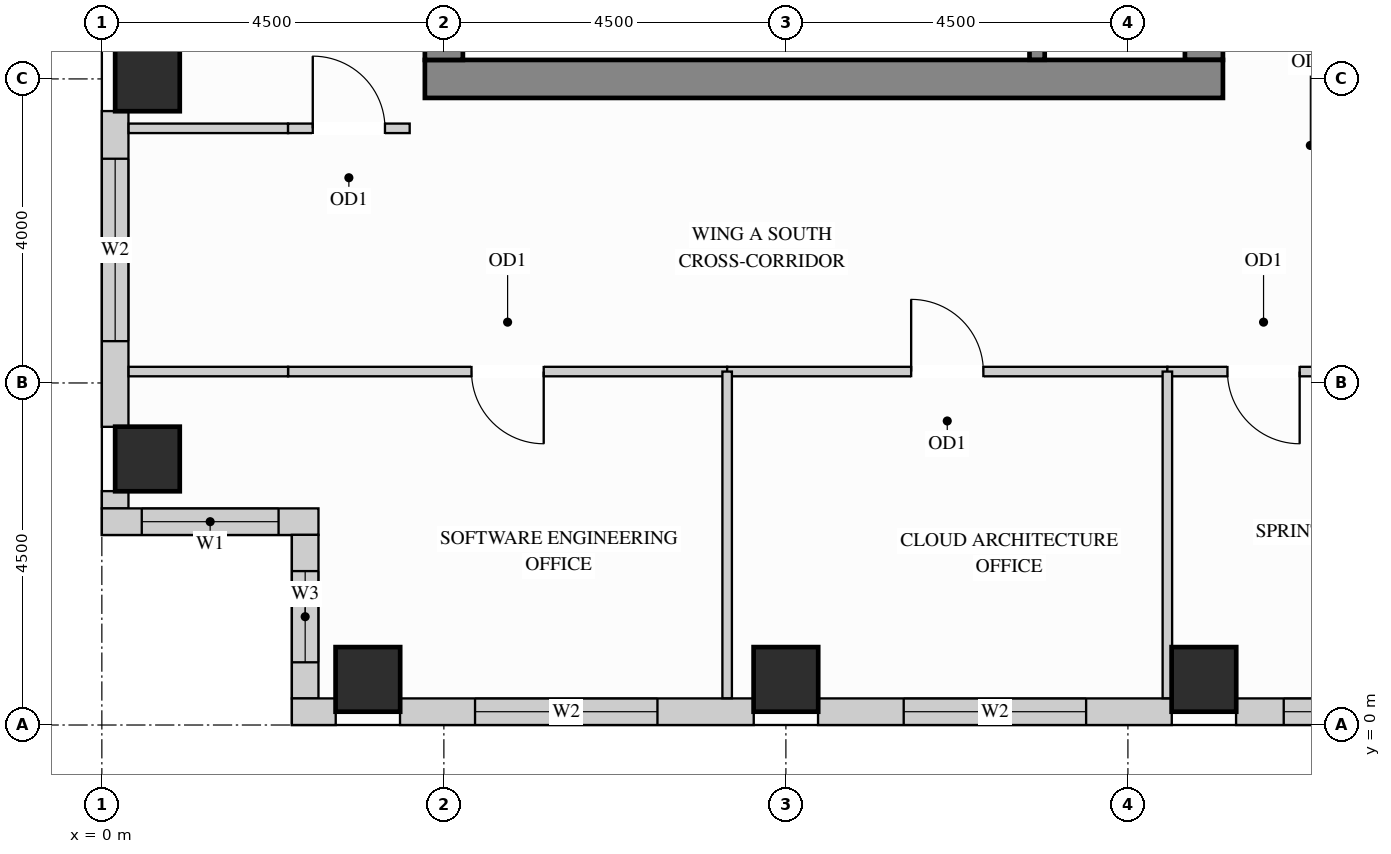
"""IFC4 building model, lengths in metres.
Left out: names, types, materials, properties, quantities, classifications, styles, units other than length and angle.
Written with IfcOpenShell. Run it as: python <this file> out.ifc"""

import sys

from ifc_helpers import new_model, si_unit, direction, frame, frame_2d, origin, origin_2d, place, context, subcontext, project, spatial, rectangle, extrude, source, transform, mapped, element, fill, save


model = new_model("IFC4")
c1 = context("Model", 3, precision=1e-05, world=origin(), true_north=direction((0.0, 1.0)))
c2 = subcontext(c1, "Body", "Model", "MODEL_VIEW")
j1 = project(units=[si_unit("LENGTHUNIT", "METRE"), si_unit("PLANEANGLEUNIT", "RADIAN")], contexts=[c1])
p1 = place(None, origin())
s1 = spatial("IfcSite", under=j1, at=p1, CompositionType="ELEMENT")
p2 = place(p1, origin())
s2 = spatial("IfcBuilding", under=s1, at=p2, CompositionType="ELEMENT")
p3 = place(p2, frame((0.0, 0.0, 212.4)))
s3 = spatial("IfcBuildingStorey", under=s2, at=p3, CompositionType="ELEMENT", Elevation=212.4)
m1 = source(origin(), c2, "Body", "SweptSolid", [
    extrude(rectangle(XDim=0.85, YDim=0.85, at=origin_2d()), origin(), (0.0, 0.0, 1.0), 3.4),
])
for number, where, z_axis, x_axis in (
    (1, (14.5, 0.6, 0.0), (0.0, 0.0, 1.0), (1.0, 0.0, 0.0)),
    (2, (3.5, 0.6, 0.0), (0.0, 0.0, 1.0), (1.0, 0.0, 0.0)),
    (3, (9.0, 0.6, 0.0), (0.0, 0.0, 1.0), (1.0, 0.0, 0.0)),
    (4, (0.6, 3.5, 0.0), (0.0, 0.0, 1.0), (1.0, 0.0, 0.0)),
    (5, (0.6, 8.5, 0.0), (0.0, 0.0, 1.0), (1.0, 0.0, 0.0)),
):
    element("IfcColumn", number, at=place(p3, frame(where, z_axis=z_axis, x_axis=x_axis)), inside=s3, PredefinedType="COLUMN", context=c2, shape_type="MappedRepresentation", body=[
        mapped(m1, transform((0.0, 0.0, 0.0), x_axis=(1.0, 0.0, 0.0), y_axis=(0.0, 1.0, 0.0), z_axis=(0.0, 0.0, 1.0))),
    ])
m2 = source(origin(), c2, "Body", "SweptSolid", [
    extrude(rectangle(XDim=10.07, YDim=0.5, at=frame_2d((5.035, 0.0))), origin(), (0.0, 0.0, 1.0), 3.4),
])
p4 = place(p3, frame((14.5, 8.75, 0.0), z_axis=(0.0, 0.0, 1.0), x_axis=(0.0, 1.0, 0.0)))
e6 = element("IfcWall", 6, at=p4, inside=s3, PredefinedType="SHEAR", context=c2, shape_type="MappedRepresentation", body=[
    mapped(m2, transform((0.0, 0.0, 0.0), x_axis=(1.0, 0.0, 0.0), y_axis=(0.0, 1.0, 0.0), z_axis=(0.0, 0.0, 1.0))),
])
m3 = source(origin(), c2, "Body", "SweptSolid", [
    extrude(rectangle(XDim=10.5, YDim=0.5, at=frame_2d((5.25, 0.0))), origin(), (0.0, 0.0, 1.0), 3.4),
])
p5 = place(p3, frame((4.25, 8.5, 0.0), z_axis=(0.0, 0.0, 1.0), x_axis=(1.0, 0.0, 0.0)))
e7 = element("IfcWall", 7, at=p5, inside=s3, PredefinedType="SHEAR", context=c2, shape_type="MappedRepresentation", body=[
    mapped(m3, transform((0.0, 0.0, 0.0), x_axis=(1.0, 0.0, 0.0), y_axis=(0.0, 1.0, 0.0), z_axis=(0.0, 0.0, 1.0))),
])
m4 = source(origin(), c2, "Body", "SweptSolid", [
    extrude(rectangle(XDim=20.5, YDim=0.5, at=frame_2d((10.25, 0.0))), origin(), (0.0, 0.0, 1.0), 3.4),
])
p6 = place(p3, frame((4.5, 8.75, 0.0), z_axis=(0.0, 0.0, 1.0), x_axis=(0.0, 1.0, 0.0)))
e8 = element("IfcWall", 8, at=p6, inside=s3, PredefinedType="SHEAR", context=c2, shape_type="MappedRepresentation", body=[
    mapped(m4, transform((0.0, 0.0, 0.0), x_axis=(1.0, 0.0, 0.0), y_axis=(0.0, 1.0, 0.0), z_axis=(0.0, 0.0, 1.0))),
])
p7 = place(p3, frame((0.175, 8.077, 0.0), z_axis=(0.0, 0.0, 1.0), x_axis=(0.0, -1.0, 0.0)))
e9 = element("IfcWall", 9, at=p7, inside=s3, PredefinedType="SOLIDWALL", context=c2, shape_type="SweptSolid", body=[
    extrude(rectangle(XDim=4.154, YDim=0.35, at=frame_2d((2.077, 0.0))), origin(), (0.0, 0.0, 1.0), 3.385),
])
p8 = place(p7, frame((0.627, 0.0, 0.78)))
e10 = element("IfcOpeningElement", 10, at=p8, cuts=e9, PredefinedType="OPENING", context=c2, shape_type="SweptSolid", body=[
    extrude(rectangle(XDim=2.4, YDim=2.1, at=frame_2d((1.2, 1.05))), frame((0.0, 0.185, 0.0), z_axis=(0.0, -1.0, 0.0), x_axis=(1.0, 0.0, 0.0)), (0.0, 0.0, 1.0), 0.37),
])
m5 = source(origin(), c2, "Body", "SweptSolid", [
    extrude(rectangle(XDim=0.229, YDim=0.35, at=frame_2d((0.115, 0.0))), origin(), (0.0, 0.0, 1.0), 3.385),
])
p9 = place(p3, frame((0.175, 3.077, 0.0), z_axis=(0.0, 0.0, 1.0), x_axis=(0.0, -1.0, 0.0)))
e11 = element("IfcWall", 11, at=p9, inside=s3, PredefinedType="SOLIDWALL", context=c2, shape_type="MappedRepresentation", body=[
    mapped(m5, transform((0.0, 0.0, 0.0), x_axis=(1.0, 0.0, 0.0), y_axis=(0.0, 1.0, 0.0), z_axis=(0.0, 0.0, 1.0))),
])
p10 = place(p3, frame((0.0, 2.675, 0.0), z_axis=(0.0, 0.0, 1.0), x_axis=(1.0, 0.0, 0.0)))
e12 = element("IfcWall", 12, at=p10, inside=s3, PredefinedType="SOLIDWALL", context=c2, shape_type="SweptSolid", body=[
    extrude(rectangle(XDim=2.85, YDim=0.35, at=frame_2d((1.425, 0.0))), origin(), (0.0, 0.0, 1.0), 3.385),
])
p11 = place(p10, frame((0.525, 0.0, 0.78)))
e13 = element("IfcOpeningElement", 13, at=p11, cuts=e12, PredefinedType="OPENING", context=c2, shape_type="SweptSolid", body=[
    extrude(rectangle(XDim=1.8, YDim=2.1, at=frame_2d((0.9, 1.05))), frame((0.0, 0.185, 0.0), z_axis=(0.0, -1.0, 0.0), x_axis=(1.0, 0.0, 0.0)), (0.0, 0.0, 1.0), 0.37),
])
p12 = place(p3, frame((2.675, 2.502, 0.0), z_axis=(0.0, 0.0, 1.0), x_axis=(0.0, -1.0, 0.0)))
e14 = element("IfcWall", 14, at=p12, inside=s3, PredefinedType="SOLIDWALL", context=c2, shape_type="SweptSolid", body=[
    extrude(rectangle(XDim=2.154, YDim=0.35, at=frame_2d((1.077, 0.0))), origin(), (0.0, 0.0, 1.0), 3.385),
])
p13 = place(p12, frame((0.477, 0.0, 0.78)))
e15 = element("IfcOpeningElement", 15, at=p13, cuts=e14, PredefinedType="OPENING", context=c2, shape_type="SweptSolid", body=[
    extrude(rectangle(XDim=1.2, YDim=2.1, at=frame_2d((0.6, 1.05))), frame((0.0, 0.185, 0.0), z_axis=(0.0, -1.0, 0.0), x_axis=(1.0, 0.0, 0.0)), (0.0, 0.0, 1.0), 0.37),
])
m6 = source(origin(), c2, "Body", "SweptSolid", [
    extrude(rectangle(XDim=0.577, YDim=0.35, at=frame_2d((0.289, 0.0))), origin(), (0.0, 0.0, 1.0), 3.385),
])
p14 = place(p3, frame((2.5, 0.175, 0.0), z_axis=(0.0, 0.0, 1.0), x_axis=(1.0, 0.0, 0.0)))
e16 = element("IfcWall", 16, at=p14, inside=s3, PredefinedType="SOLIDWALL", context=c2, shape_type="MappedRepresentation", body=[
    mapped(m6, transform((0.0, 0.0, 0.0), x_axis=(1.0, 0.0, 0.0), y_axis=(0.0, 1.0, 0.0), z_axis=(0.0, 0.0, 1.0))),
])
p15 = place(p3, frame((3.923, 0.175, 0.0), z_axis=(0.0, 0.0, 1.0), x_axis=(1.0, 0.0, 0.0)))
e17 = element("IfcWall", 17, at=p15, inside=s3, PredefinedType="SOLIDWALL", context=c2, shape_type="SweptSolid", body=[
    extrude(rectangle(XDim=4.654, YDim=0.35, at=frame_2d((2.327, 0.0))), origin(), (0.0, 0.0, 1.0), 3.385),
])
p16 = place(p15, frame((0.987, 0.0, 0.78)))
e18 = element("IfcOpeningElement", 18, at=p16, cuts=e17, PredefinedType="OPENING", context=c2, shape_type="SweptSolid", body=[
    extrude(rectangle(XDim=2.4, YDim=2.1, at=frame_2d((1.2, 1.05))), frame((0.0, 0.185, 0.0), z_axis=(0.0, -1.0, 0.0), x_axis=(1.0, 0.0, 0.0)), (0.0, 0.0, 1.0), 0.37),
])
p17 = place(p3, frame((9.423, 0.175, 0.0), z_axis=(0.0, 0.0, 1.0), x_axis=(1.0, 0.0, 0.0)))
e19 = element("IfcWall", 19, at=p17, inside=s3, PredefinedType="SOLIDWALL", context=c2, shape_type="SweptSolid", body=[
    extrude(rectangle(XDim=4.654, YDim=0.35, at=frame_2d((2.327, 0.0))), origin(), (0.0, 0.0, 1.0), 3.385),
])
p18 = place(p17, frame((1.127, 0.0, 0.78)))
e20 = element("IfcOpeningElement", 20, at=p18, cuts=e19, PredefinedType="OPENING", context=c2, shape_type="SweptSolid", body=[
    extrude(rectangle(XDim=2.4, YDim=2.1, at=frame_2d((1.2, 1.05))), frame((0.0, 0.185, 0.0), z_axis=(0.0, -1.0, 0.0), x_axis=(1.0, 0.0, 0.0)), (0.0, 0.0, 1.0), 0.37),
])
p19 = place(p3, frame((14.923, 0.175, 0.0), z_axis=(0.0, 0.0, 1.0), x_axis=(1.0, 0.0, 0.0)))
e21 = element("IfcWall", 21, at=p19, inside=s3, PredefinedType="SOLIDWALL", context=c2, shape_type="SweptSolid", body=[
    extrude(rectangle(XDim=3.654, YDim=0.35, at=frame_2d((1.827, 0.0))), origin(), (0.0, 0.0, 1.0), 3.385),
])
p20 = place(p19, frame((0.627, 0.0, 0.78)))
e22 = element("IfcOpeningElement", 22, at=p20, cuts=e21, PredefinedType="OPENING", context=c2, shape_type="SweptSolid", body=[
    extrude(rectangle(XDim=2.4, YDim=2.1, at=frame_2d((1.2, 1.05))), frame((0.0, 0.185, 0.0), z_axis=(0.0, -1.0, 0.0), x_axis=(1.0, 0.0, 0.0)), (0.0, 0.0, 1.0), 0.37),
])
m7 = source(origin(), c2, "Body", "SweptSolid", [
    extrude(rectangle(XDim=2.098, YDim=0.125, at=frame_2d((1.049, 0.0))), origin(), (0.0, 0.0, 1.0), 3.385),
])
p21 = place(p3, frame((0.352, 7.85, 0.0), z_axis=(0.0, 0.0, 1.0), x_axis=(1.0, 0.0, 0.0)))
e23 = element("IfcWall", 23, at=p21, inside=s3, PredefinedType="PARTITIONING", context=c2, shape_type="MappedRepresentation", body=[
    mapped(m7, transform((0.0, 0.0, 0.0), x_axis=(1.0, 0.0, 0.0), y_axis=(0.0, 1.0, 0.0), z_axis=(0.0, 0.0, 1.0))),
])
p22 = place(p3, frame((2.45, 7.85, 0.0), z_axis=(0.0, 0.0, 1.0), x_axis=(1.0, 0.0, 0.0)))
e24 = element("IfcWall", 24, at=p22, inside=s3, PredefinedType="PARTITIONING", context=c2, shape_type="SweptSolid", body=[
    extrude(rectangle(XDim=1.6, YDim=0.125, at=frame_2d((0.8, 0.0))), origin(), (0.0, 0.0, 1.0), 3.385),
])
p23 = place(p22, frame((0.325, 0.0, 0.0)))
e25 = element("IfcOpeningElement", 25, at=p23, cuts=e24, PredefinedType="OPENING", context=c2, shape_type="SweptSolid", body=[
    extrude(rectangle(XDim=0.95, YDim=2.15, at=frame_2d((0.475, 1.075))), frame((0.0, 0.073, 0.0), z_axis=(0.0, -1.0, 0.0), x_axis=(1.0, 0.0, 0.0)), (0.0, 0.0, 1.0), 0.145),
])
p24 = place(p3, frame((2.45, 4.65, 0.0), z_axis=(0.0, 0.0, 1.0), x_axis=(1.0, 0.0, 0.0)))
e26 = element("IfcWall", 26, at=p24, inside=s3, PredefinedType="PARTITIONING", context=c2, shape_type="SweptSolid", body=[
    extrude(rectangle(XDim=5.777, YDim=0.125, at=frame_2d((2.889, 0.0))), origin(), (0.0, 0.0, 1.0), 2.848),
])
p25 = place(p24, frame((2.414, 0.0, 0.0)))
e27 = element("IfcOpeningElement", 27, at=p25, cuts=e26, PredefinedType="OPENING", context=c2, shape_type="SweptSolid", body=[
    extrude(rectangle(XDim=0.95, YDim=2.15, at=frame_2d((0.475, 1.075))), frame((0.0, 0.073, 0.0), z_axis=(0.0, -1.0, 0.0), x_axis=(1.0, 0.0, 0.0)), (0.0, 0.0, 1.0), 0.145),
])
p26 = place(p3, frame((8.227, 4.65, 0.0), z_axis=(0.0, 0.0, 1.0), x_axis=(1.0, 0.0, 0.0)))
e28 = element("IfcWall", 28, at=p26, inside=s3, PredefinedType="PARTITIONING", context=c2, shape_type="SweptSolid", body=[
    extrude(rectangle(XDim=5.792, YDim=0.125, at=frame_2d((2.896, 0.0))), origin(), (0.0, 0.0, 1.0), 2.848),
])
p27 = place(p26, frame((2.421, 0.0, 0.0)))
e29 = element("IfcOpeningElement", 29, at=p27, cuts=e28, PredefinedType="OPENING", context=c2, shape_type="SweptSolid", body=[
    extrude(rectangle(XDim=0.95, YDim=2.15, at=frame_2d((0.475, 1.075))), frame((0.0, 0.073, 0.0), z_axis=(0.0, -1.0, 0.0), x_axis=(1.0, 0.0, 0.0)), (0.0, 0.0, 1.0), 0.145),
])
p28 = place(p3, frame((14.019, 4.65, 0.0), z_axis=(0.0, 0.0, 1.0), x_axis=(1.0, 0.0, 0.0)))
e30 = element("IfcWall", 30, at=p28, inside=s3, PredefinedType="PARTITIONING", context=c2, shape_type="SweptSolid", body=[
    extrude(rectangle(XDim=2.531, YDim=0.125, at=frame_2d((1.266, 0.0))), origin(), (0.0, 0.0, 1.0), 2.848),
])
p29 = place(p28, frame((0.791, 0.0, 0.0)))
e31 = element("IfcOpeningElement", 31, at=p29, cuts=e30, PredefinedType="OPENING", context=c2, shape_type="SweptSolid", body=[
    extrude(rectangle(XDim=0.95, YDim=2.15, at=frame_2d((0.475, 1.075))), frame((0.0, 0.073, 0.0), z_axis=(0.0, -1.0, 0.0), x_axis=(1.0, 0.0, 0.0)), (0.0, 0.0, 1.0), 0.145),
])
m8 = source(origin(), c2, "Body", "SweptSolid", [
    extrude(rectangle(XDim=2.098, YDim=0.125, at=frame_2d((1.049, 0.0))), origin(), (0.0, 0.0, 1.0), 2.848),
])
p30 = place(p3, frame((0.352, 4.65, 0.0), z_axis=(0.0, 0.0, 1.0), x_axis=(1.0, 0.0, 0.0)))
e32 = element("IfcWall", 32, at=p30, inside=s3, PredefinedType="PARTITIONING", context=c2, shape_type="MappedRepresentation", body=[
    mapped(m8, transform((0.0, 0.0, 0.0), x_axis=(1.0, 0.0, 0.0), y_axis=(0.0, 1.0, 0.0), z_axis=(0.0, 0.0, 1.0))),
])
m9 = source(origin(), c2, "Body", "SweptSolid", [
    extrude(rectangle(XDim=4.298, YDim=0.125, at=frame_2d((2.149, 0.0))), origin(), (0.0, 0.0, 1.0), 3.385),
])
for number, where, z_axis, x_axis in (
    (33, (8.227, 0.352, 0.0), (0.0, 0.0, 1.0), (0.0, 1.0, 0.0)),
    (34, (14.019, 0.352, 0.0), (0.0, 0.0, 1.0), (0.0, 1.0, 0.0)),
):
    element("IfcWall", number, at=place(p3, frame(where, z_axis=z_axis, x_axis=x_axis)), inside=s3, PredefinedType="PARTITIONING", context=c2, shape_type="MappedRepresentation", body=[
        mapped(m9, transform((0.0, 0.0, 0.0), x_axis=(1.0, 0.0, 0.0), y_axis=(0.0, 1.0, 0.0), z_axis=(0.0, 0.0, 1.0))),
    ])
m10 = source(origin(), c2, "Body", "SweptSolid", [
    extrude(rectangle(XDim=3.803, YDim=0.2, at=frame_2d((1.901, 0.0))), origin(), (0.0, 0.0, 1.0), 3.4),
])
p31 = place(p3, frame((12.305, 8.752, 0.0), z_axis=(0.0, 0.0, 1.0), x_axis=(0.0, 1.0, 0.0)))
e35 = element("IfcWall", 35, at=p31, inside=s3, PredefinedType="SHEAR", context=c2, shape_type="MappedRepresentation", body=[
    mapped(m10, transform((0.0, 0.0, 0.0), x_axis=(1.0, 0.0, 0.0), y_axis=(0.0, 1.0, 0.0), z_axis=(0.0, 0.0, 1.0))),
])
m11 = source(origin(), c2, "Body", "SweptSolid", [
    extrude(rectangle(XDim=0.95, YDim=2.15, at=frame_2d((0.475, 1.075))), frame((0.0, 0.025, 0.0), z_axis=(0.0, -1.0, 0.0), x_axis=(1.0, 0.0, 0.0)), (0.0, 0.0, 1.0), 0.05),
])
p32 = place(p25, origin())
e36 = element("IfcDoor", 36, at=p32, inside=s3, OperationType="SINGLE_SWING_RIGHT", PredefinedType="DOOR", context=c2, shape_type="MappedRepresentation", body=[
    mapped(m11, transform((0.0, 0.0, 0.0), x_axis=(1.0, 0.0, 0.0), y_axis=(0.0, 1.0, 0.0), z_axis=(0.0, 0.0, 1.0))),
])
fill(e27, e36)
p33 = place(p27, origin())
e37 = element("IfcDoor", 37, at=p33, inside=s3, OperationType="SINGLE_SWING_LEFT", PredefinedType="DOOR", context=c2, shape_type="MappedRepresentation", body=[
    mapped(m11, transform((0.0, 0.0, 0.0), x_axis=(1.0, 0.0, 0.0), y_axis=(0.0, 1.0, 0.0), z_axis=(0.0, 0.0, 1.0))),
])
fill(e29, e37)
p34 = place(p29, origin())
e38 = element("IfcDoor", 38, at=p34, inside=s3, OperationType="SINGLE_SWING_RIGHT", PredefinedType="DOOR", context=c2, shape_type="MappedRepresentation", body=[
    mapped(m11, transform((0.0, 0.0, 0.0), x_axis=(1.0, 0.0, 0.0), y_axis=(0.0, 1.0, 0.0), z_axis=(0.0, 0.0, 1.0))),
])
fill(e31, e38)
p35 = place(p23, origin())
e39 = element("IfcDoor", 39, at=p35, inside=s3, OperationType="SINGLE_SWING_LEFT", PredefinedType="DOOR", context=c2, shape_type="MappedRepresentation", body=[
    mapped(m11, transform((0.0, 0.0, 0.0), x_axis=(1.0, 0.0, 0.0), y_axis=(0.0, 1.0, 0.0), z_axis=(0.0, 0.0, 1.0))),
])
fill(e25, e39)
m12 = source(origin(), c2, "Body", "SweptSolid", [
    extrude(rectangle(XDim=1.8, YDim=2.1, at=frame_2d((0.9, 1.05))), frame((0.0, 0.03, 0.0), z_axis=(0.0, -1.0, 0.0), x_axis=(1.0, 0.0, 0.0)), (0.0, 0.0, 1.0), 0.06),
])
p36 = place(p11, origin())
e40 = element("IfcWindow", 40, at=p36, inside=s3, PartitioningType="SINGLE_PANEL", PredefinedType="WINDOW", context=c2, shape_type="MappedRepresentation", body=[
    mapped(m12, transform((0.0, 0.0, 0.0), x_axis=(1.0, 0.0, 0.0), y_axis=(0.0, 1.0, 0.0), z_axis=(0.0, 0.0, 1.0))),
])
fill(e13, e40)
m13 = source(origin(), c2, "Body", "SweptSolid", [
    extrude(rectangle(XDim=2.4, YDim=2.1, at=frame_2d((1.2, 1.05))), frame((0.0, 0.03, 0.0), z_axis=(0.0, -1.0, 0.0), x_axis=(1.0, 0.0, 0.0)), (0.0, 0.0, 1.0), 0.06),
])
p37 = place(p8, origin())
e41 = element("IfcWindow", 41, at=p37, inside=s3, PartitioningType="SINGLE_PANEL", PredefinedType="WINDOW", context=c2, shape_type="MappedRepresentation", body=[
    mapped(m13, transform((0.0, 0.0, 0.0), x_axis=(1.0, 0.0, 0.0), y_axis=(0.0, 1.0, 0.0), z_axis=(0.0, 0.0, 1.0))),
])
fill(e10, e41)
p38 = place(p16, origin())
e42 = element("IfcWindow", 42, at=p38, inside=s3, PartitioningType="SINGLE_PANEL", PredefinedType="WINDOW", context=c2, shape_type="MappedRepresentation", body=[
    mapped(m13, transform((0.0, 0.0, 0.0), x_axis=(1.0, 0.0, 0.0), y_axis=(0.0, 1.0, 0.0), z_axis=(0.0, 0.0, 1.0))),
])
fill(e18, e42)
p39 = place(p18, origin())
e43 = element("IfcWindow", 43, at=p39, inside=s3, PartitioningType="SINGLE_PANEL", PredefinedType="WINDOW", context=c2, shape_type="MappedRepresentation", body=[
    mapped(m13, transform((0.0, 0.0, 0.0), x_axis=(1.0, 0.0, 0.0), y_axis=(0.0, 1.0, 0.0), z_axis=(0.0, 0.0, 1.0))),
])
fill(e20, e43)
p40 = place(p20, origin())
e44 = element("IfcWindow", 44, at=p40, inside=s3, PartitioningType="SINGLE_PANEL", PredefinedType="WINDOW", context=c2, shape_type="MappedRepresentation", body=[
    mapped(m13, transform((0.0, 0.0, 0.0), x_axis=(1.0, 0.0, 0.0), y_axis=(0.0, 1.0, 0.0), z_axis=(0.0, 0.0, 1.0))),
])
fill(e22, e44)
m14 = source(origin(), c2, "Body", "SweptSolid", [
    extrude(rectangle(XDim=1.2, YDim=2.1, at=frame_2d((0.6, 1.05))), frame((0.0, 0.03, 0.0), z_axis=(0.0, -1.0, 0.0), x_axis=(1.0, 0.0, 0.0)), (0.0, 0.0, 1.0), 0.06),
])
p41 = place(p13, origin())
e45 = element("IfcWindow", 45, at=p41, inside=s3, PartitioningType="SINGLE_PANEL", PredefinedType="WINDOW", context=c2, shape_type="MappedRepresentation", body=[
    mapped(m14, transform((0.0, 0.0, 0.0), x_axis=(1.0, 0.0, 0.0), y_axis=(0.0, 1.0, 0.0), z_axis=(0.0, 0.0, 1.0))),
])
fill(e15, e45)
save(model, sys.argv[1])
